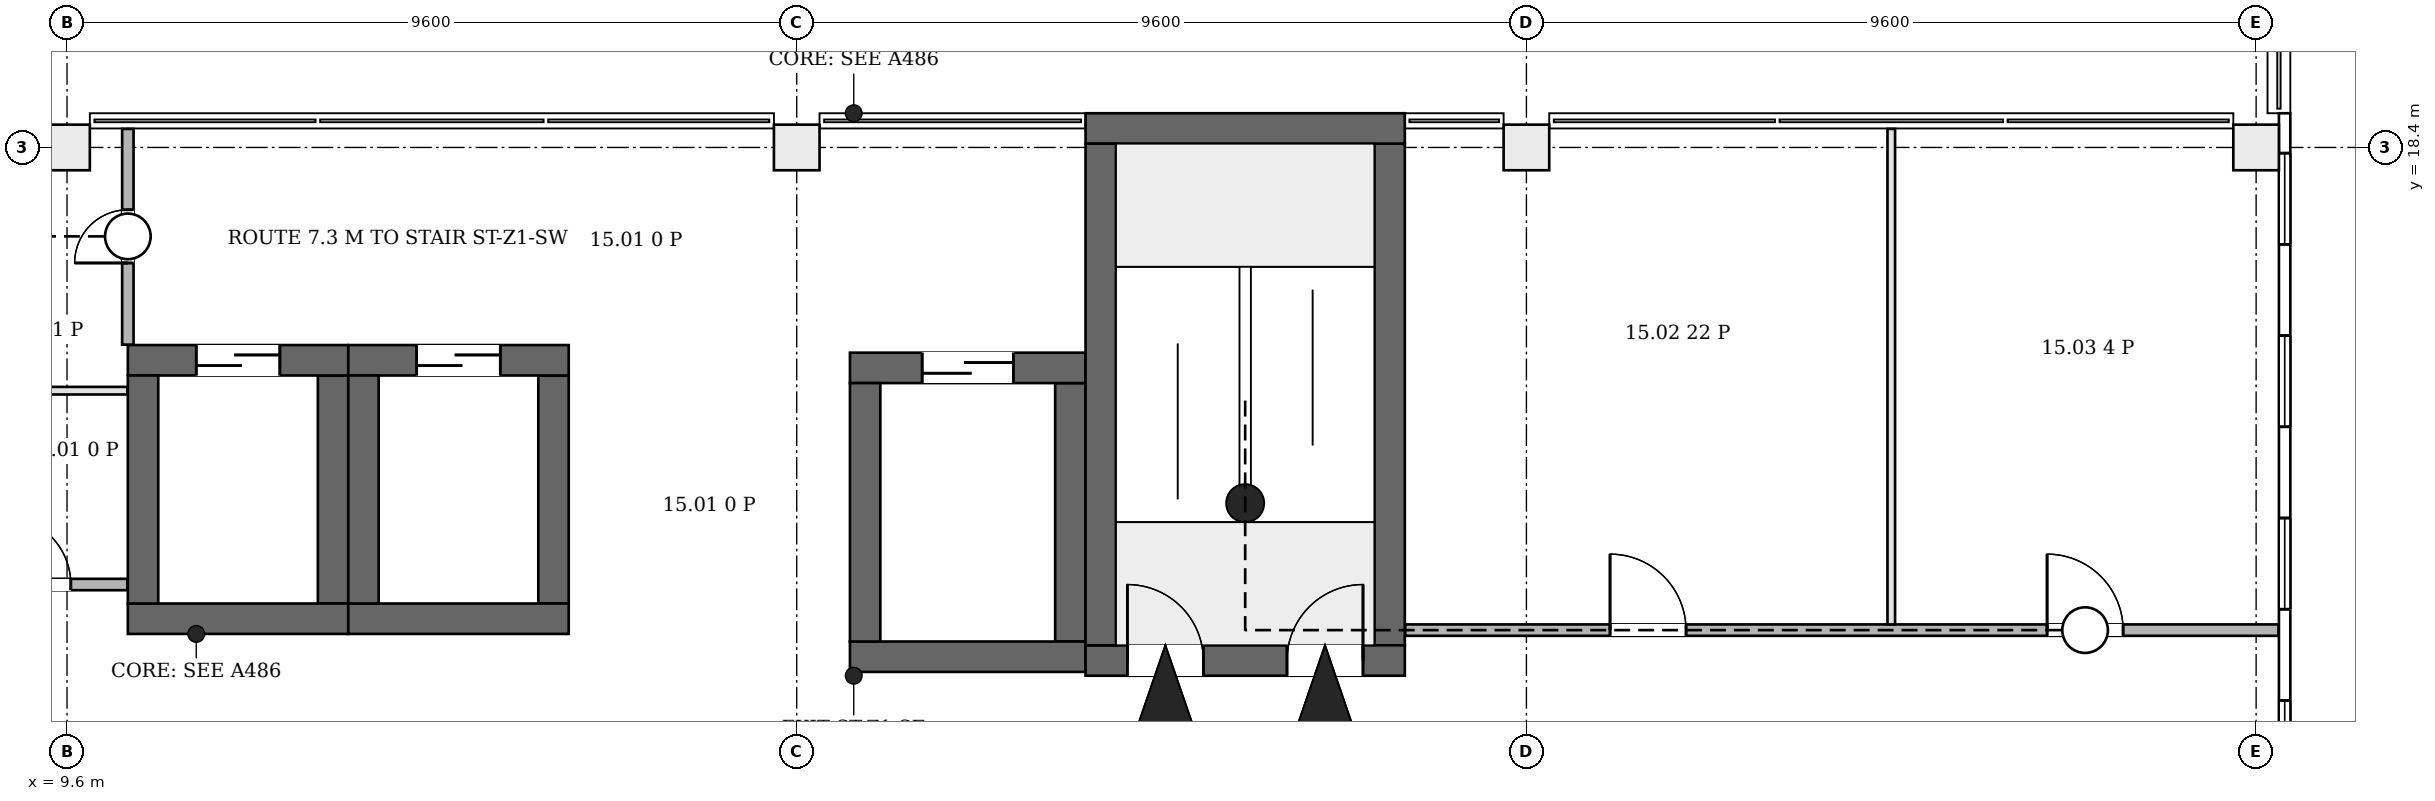
"""IFC4 building model, lengths in metres.
Left out: names, types, materials, properties, quantities, classifications, styles, units other than length and angle.
Written with IfcOpenShell. Run it as: python <this file> out.ifc"""

import sys

from ifc_helpers import new_model, si_unit, direction, frame, frame_2d, origin, origin_2d, place, context, subcontext, project, spatial, rectangle, extrude, element, fill, save


model = new_model("IFC4")
c1 = context("Model", 3, precision=1e-05, world=origin(), true_north=direction((0.0, 1.0)))
c2 = subcontext(c1, "Body", "Model", "MODEL_VIEW")
j1 = project(units=[si_unit("LENGTHUNIT", "METRE"), si_unit("PLANEANGLEUNIT", "RADIAN")], contexts=[c1])
p1 = place(None, origin())
s1 = spatial("IfcSite", under=j1, at=p1, CompositionType="ELEMENT")
p2 = place(p1, origin())
s2 = spatial("IfcBuilding", under=s1, at=p2, CompositionType="ELEMENT")
p3 = place(p2, frame((0.0, 0.0, 73.9)))
s3 = spatial("IfcBuildingStorey", under=s2, at=p3, CompositionType="ELEMENT", Elevation=73.9)
p4 = place(p3, frame((23.0, 11.65, 0.0), z_axis=(0.0, 0.0, 1.0), x_axis=(1.0, 0.0, 0.0)))
e1 = element("IfcWall", 1, at=p4, inside=s3, PredefinedType="SHEAR", context=c2, shape_type="SweptSolid", body=[
    extrude(rectangle(XDim=4.2, YDim=0.4, at=frame_2d((2.1, 0.0))), origin(), (0.0, 0.0, 1.0), 4.2),
])
p5 = place(p4, frame((0.55, 0.0, 0.0)))
e2 = element("IfcOpeningElement", 2, at=p5, cuts=e1, PredefinedType="OPENING", context=c2, shape_type="SweptSolid", body=[
    extrude(rectangle(XDim=1.0, YDim=2.1, at=frame_2d((0.5, 1.05))), frame((0.0, 0.21, 0.0), z_axis=(0.0, -1.0, 0.0), x_axis=(1.0, 0.0, 0.0)), (0.0, 0.0, 1.0), 0.42),
])
p6 = place(p4, frame((2.65, 0.0, 0.0)))
e3 = element("IfcOpeningElement", 3, at=p6, cuts=e1, PredefinedType="OPENING", context=c2, shape_type="SweptSolid", body=[
    extrude(rectangle(XDim=1.0, YDim=2.1, at=frame_2d((0.5, 1.05))), frame((0.0, 0.21, 0.0), z_axis=(0.0, -1.0, 0.0), x_axis=(1.0, 0.0, 0.0)), (0.0, 0.0, 1.0), 0.42),
])
p7 = place(p3, frame((23.0, 18.65, 0.0), z_axis=(0.0, 0.0, 1.0), x_axis=(1.0, 0.0, 0.0)))
e4 = element("IfcWall", 4, at=p7, inside=s3, PredefinedType="SHEAR", context=c2, shape_type="SweptSolid", body=[
    extrude(rectangle(XDim=4.2, YDim=0.4, at=frame_2d((2.1, 0.0))), origin(), (0.0, 0.0, 1.0), 4.2),
])
for number, where, z_axis, x_axis in (
    (5, (23.2, 11.85, 0.0), (0.0, 0.0, 1.0), (0.0, 1.0, 0.0)),
    (6, (27.0, 11.85, 0.0), (0.0, 0.0, 1.0), (0.0, 1.0, 0.0)),
):
    element("IfcWall", number, at=place(p3, frame(where, z_axis=z_axis, x_axis=x_axis)), inside=s3, PredefinedType="SHEAR", context=c2, shape_type="SweptSolid", body=[
        extrude(rectangle(XDim=6.6, YDim=0.4, at=frame_2d((3.3, 0.0))), origin(), (0.0, 0.0, 1.0), 4.2),
    ])
p8 = place(p3, frame((10.4, 12.2, 0.0), z_axis=(0.0, 0.0, 1.0), x_axis=(1.0, 0.0, 0.0)))
e7 = element("IfcWall", 7, at=p8, inside=s3, PredefinedType="SHEAR", context=c2, shape_type="SweptSolid", body=[
    extrude(rectangle(XDim=2.9, YDim=0.4, at=frame_2d((1.45, 0.0))), origin(), (0.0, 0.0, 1.0), 4.2),
])
p9 = place(p3, frame((10.4, 15.6, 0.0), z_axis=(0.0, 0.0, 1.0), x_axis=(1.0, 0.0, 0.0)))
e8 = element("IfcWall", 8, at=p9, inside=s3, PredefinedType="SHEAR", context=c2, shape_type="SweptSolid", body=[
    extrude(rectangle(XDim=2.9, YDim=0.4, at=frame_2d((1.45, 0.0))), origin(), (0.0, 0.0, 1.0), 4.2),
])
p10 = place(p9, frame((0.9, 0.0, 0.0)))
e9 = element("IfcOpeningElement", 9, at=p10, cuts=e8, PredefinedType="OPENING", context=c2, shape_type="SweptSolid", body=[
    extrude(rectangle(XDim=1.1, YDim=2.1, at=frame_2d((0.55, 1.05))), frame((0.0, 0.21, 0.0), z_axis=(0.0, -1.0, 0.0), x_axis=(1.0, 0.0, 0.0)), (0.0, 0.0, 1.0), 0.42),
])
for number, where, z_axis, x_axis in (
    (10, (10.6, 12.4, 0.0), (0.0, 0.0, 1.0), (0.0, 1.0, 0.0)),
    (11, (13.1, 12.4, 0.0), (0.0, 0.0, 1.0), (0.0, 1.0, 0.0)),
):
    element("IfcWall", number, at=place(p3, frame(where, z_axis=z_axis, x_axis=x_axis)), inside=s3, PredefinedType="SHEAR", context=c2, shape_type="SweptSolid", body=[
        extrude(rectangle(XDim=3.0, YDim=0.4, at=frame_2d((1.5, 0.0))), origin(), (0.0, 0.0, 1.0), 4.2),
    ])
p11 = place(p3, frame((13.3, 12.2, 0.0), z_axis=(0.0, 0.0, 1.0), x_axis=(1.0, 0.0, 0.0)))
e12 = element("IfcWall", 12, at=p11, inside=s3, PredefinedType="SHEAR", context=c2, shape_type="SweptSolid", body=[
    extrude(rectangle(XDim=2.9, YDim=0.4, at=frame_2d((1.45, 0.0))), origin(), (0.0, 0.0, 1.0), 4.2),
])
p12 = place(p3, frame((13.3, 15.6, 0.0), z_axis=(0.0, 0.0, 1.0), x_axis=(1.0, 0.0, 0.0)))
e13 = element("IfcWall", 13, at=p12, inside=s3, PredefinedType="SHEAR", context=c2, shape_type="SweptSolid", body=[
    extrude(rectangle(XDim=2.9, YDim=0.4, at=frame_2d((1.45, 0.0))), origin(), (0.0, 0.0, 1.0), 4.2),
])
p13 = place(p12, frame((0.9, 0.0, 0.0)))
e14 = element("IfcOpeningElement", 14, at=p13, cuts=e13, PredefinedType="OPENING", context=c2, shape_type="SweptSolid", body=[
    extrude(rectangle(XDim=1.1, YDim=2.1, at=frame_2d((0.55, 1.05))), frame((0.0, 0.21, 0.0), z_axis=(0.0, -1.0, 0.0), x_axis=(1.0, 0.0, 0.0)), (0.0, 0.0, 1.0), 0.42),
])
for number, where, z_axis, x_axis in (
    (15, (13.5, 12.4, 0.0), (0.0, 0.0, 1.0), (0.0, 1.0, 0.0)),
    (16, (16.0, 12.4, 0.0), (0.0, 0.0, 1.0), (0.0, 1.0, 0.0)),
):
    element("IfcWall", number, at=place(p3, frame(where, z_axis=z_axis, x_axis=x_axis)), inside=s3, PredefinedType="SHEAR", context=c2, shape_type="SweptSolid", body=[
        extrude(rectangle(XDim=3.0, YDim=0.4, at=frame_2d((1.5, 0.0))), origin(), (0.0, 0.0, 1.0), 4.2),
    ])
p14 = place(p3, frame((19.9, 11.7, 0.0), z_axis=(0.0, 0.0, 1.0), x_axis=(1.0, 0.0, 0.0)))
e17 = element("IfcWall", 17, at=p14, inside=s3, PredefinedType="SHEAR", context=c2, shape_type="SweptSolid", body=[
    extrude(rectangle(XDim=3.1, YDim=0.4, at=frame_2d((1.55, 0.0))), origin(), (0.0, 0.0, 1.0), 4.2),
])
p15 = place(p3, frame((19.9, 15.5, 0.0), z_axis=(0.0, 0.0, 1.0), x_axis=(1.0, 0.0, 0.0)))
e18 = element("IfcWall", 18, at=p15, inside=s3, PredefinedType="SHEAR", context=c2, shape_type="SweptSolid", body=[
    extrude(rectangle(XDim=3.1, YDim=0.4, at=frame_2d((1.55, 0.0))), origin(), (0.0, 0.0, 1.0), 4.2),
])
p16 = place(p15, frame((0.95, 0.0, 0.0)))
e19 = element("IfcOpeningElement", 19, at=p16, cuts=e18, PredefinedType="OPENING", context=c2, shape_type="SweptSolid", body=[
    extrude(rectangle(XDim=1.2, YDim=2.1, at=frame_2d((0.6, 1.05))), frame((0.0, 0.21, 0.0), z_axis=(0.0, -1.0, 0.0), x_axis=(1.0, 0.0, 0.0)), (0.0, 0.0, 1.0), 0.42),
])
for number, where, z_axis, x_axis in (
    (20, (20.1, 11.9, 0.0), (0.0, 0.0, 1.0), (0.0, 1.0, 0.0)),
    (21, (22.8, 11.9, 0.0), (0.0, 0.0, 1.0), (0.0, 1.0, 0.0)),
):
    element("IfcWall", number, at=place(p3, frame(where, z_axis=z_axis, x_axis=x_axis)), inside=s3, PredefinedType="SHEAR", context=c2, shape_type="SweptSolid", body=[
        extrude(rectangle(XDim=3.4, YDim=0.4, at=frame_2d((1.7, 0.0))), origin(), (0.0, 0.0, 1.0), 4.2),
    ])
for number, where, z_axis, x_axis in (
    (22, (9.6, 18.4, 0.0), (0.0, 0.0, 1.0), (1.0, 0.0, 0.0)),
    (23, (19.2, 18.4, 0.0), (0.0, 0.0, 1.0), (1.0, 0.0, 0.0)),
    (24, (28.8, 18.4, 0.0), (0.0, 0.0, 1.0), (1.0, 0.0, 0.0)),
    (25, (38.4, 18.4, 0.0), (0.0, 0.0, 1.0), (1.0, 0.0, 0.0)),
):
    element("IfcColumn", number, at=place(p3, frame(where, z_axis=z_axis, x_axis=x_axis)), inside=s3, PredefinedType="COLUMN", context=c2, shape_type="SweptSolid", body=[
        extrude(rectangle(XDim=0.6, YDim=0.6, at=origin_2d()), origin(), (0.0, 0.0, 1.0), 4.2),
    ])
p17 = place(p3, frame((38.775, -0.2, 0.0), z_axis=(0.0, 0.0, 1.0), x_axis=(0.0, 1.0, 0.0)))
e26 = element("IfcWall", 26, at=p17, inside=s3, PredefinedType="ELEMENTEDWALL", context=c2, shape_type="SweptSolid", body=[
    extrude(rectangle(XDim=19.05, YDim=0.15, at=frame_2d((9.525, 0.0))), origin(), (0.0, 0.0, 1.0), 3.9),
])
p18 = place(p17, frame((0.525, 0.0, 0.9)))
e27 = element("IfcOpeningElement", 27, at=p18, cuts=e26, PredefinedType="OPENING", context=c2, shape_type="SweptSolid", body=[
    extrude(rectangle(XDim=1.2, YDim=2.6, at=frame_2d((0.6, 1.3))), frame((0.0, 0.085, 0.0), z_axis=(0.0, -1.0, 0.0), x_axis=(1.0, 0.0, 0.0)), (0.0, 0.0, 1.0), 0.17),
])
p19 = place(p17, frame((2.925, 0.0, 0.9)))
e28 = element("IfcOpeningElement", 28, at=p19, cuts=e26, PredefinedType="OPENING", context=c2, shape_type="SweptSolid", body=[
    extrude(rectangle(XDim=1.2, YDim=2.6, at=frame_2d((0.6, 1.3))), frame((0.0, 0.085, 0.0), z_axis=(0.0, -1.0, 0.0), x_axis=(1.0, 0.0, 0.0)), (0.0, 0.0, 1.0), 0.17),
])
p20 = place(p17, frame((5.325, 0.0, 0.9)))
e29 = element("IfcOpeningElement", 29, at=p20, cuts=e26, PredefinedType="OPENING", context=c2, shape_type="SweptSolid", body=[
    extrude(rectangle(XDim=1.2, YDim=2.6, at=frame_2d((0.6, 1.3))), frame((0.0, 0.085, 0.0), z_axis=(0.0, -1.0, 0.0), x_axis=(1.0, 0.0, 0.0)), (0.0, 0.0, 1.0), 0.17),
])
p21 = place(p17, frame((7.725, 0.0, 0.9)))
e30 = element("IfcOpeningElement", 30, at=p21, cuts=e26, PredefinedType="OPENING", context=c2, shape_type="SweptSolid", body=[
    extrude(rectangle(XDim=1.2, YDim=2.6, at=frame_2d((0.6, 1.3))), frame((0.0, 0.085, 0.0), z_axis=(0.0, -1.0, 0.0), x_axis=(1.0, 0.0, 0.0)), (0.0, 0.0, 1.0), 0.17),
])
p22 = place(p17, frame((10.125, 0.0, 0.9)))
e31 = element("IfcOpeningElement", 31, at=p22, cuts=e26, PredefinedType="OPENING", context=c2, shape_type="SweptSolid", body=[
    extrude(rectangle(XDim=1.2, YDim=2.6, at=frame_2d((0.6, 1.3))), frame((0.0, 0.085, 0.0), z_axis=(0.0, -1.0, 0.0), x_axis=(1.0, 0.0, 0.0)), (0.0, 0.0, 1.0), 0.17),
])
p23 = place(p17, frame((12.525, 0.0, 0.9)))
e32 = element("IfcOpeningElement", 32, at=p23, cuts=e26, PredefinedType="OPENING", context=c2, shape_type="SweptSolid", body=[
    extrude(rectangle(XDim=1.2, YDim=2.6, at=frame_2d((0.6, 1.3))), frame((0.0, 0.085, 0.0), z_axis=(0.0, -1.0, 0.0), x_axis=(1.0, 0.0, 0.0)), (0.0, 0.0, 1.0), 0.17),
])
p24 = place(p17, frame((14.925, 0.0, 0.9)))
e33 = element("IfcOpeningElement", 33, at=p24, cuts=e26, PredefinedType="OPENING", context=c2, shape_type="SweptSolid", body=[
    extrude(rectangle(XDim=1.2, YDim=2.6, at=frame_2d((0.6, 1.3))), frame((0.0, 0.085, 0.0), z_axis=(0.0, -1.0, 0.0), x_axis=(1.0, 0.0, 0.0)), (0.0, 0.0, 1.0), 0.17),
])
p25 = place(p17, frame((17.325, 0.0, 0.9)))
e34 = element("IfcOpeningElement", 34, at=p25, cuts=e26, PredefinedType="OPENING", context=c2, shape_type="SweptSolid", body=[
    extrude(rectangle(XDim=1.2, YDim=2.6, at=frame_2d((0.6, 1.3))), frame((0.0, 0.085, 0.0), z_axis=(0.0, -1.0, 0.0), x_axis=(1.0, 0.0, 0.0)), (0.0, 0.0, 1.0), 0.17),
])
p26 = place(p3, frame((6.125, 12.65, 0.0), z_axis=(0.0, 0.0, 1.0), x_axis=(1.0, 0.0, 0.0)))
e35 = element("IfcWall", 35, at=p26, inside=s3, PredefinedType="PARTITIONING", context=c2, shape_type="SweptSolid", body=[
    extrude(rectangle(XDim=4.269, YDim=0.15, at=frame_2d((2.135, 0.0))), origin(), (0.0, 0.0, 1.0), 3.9),
])
p27 = place(p26, frame((2.625, 0.0, 0.0)))
e36 = element("IfcOpeningElement", 36, at=p27, cuts=e35, PredefinedType="OPENING", context=c2, shape_type="SweptSolid", body=[
    extrude(rectangle(XDim=0.9, YDim=2.1, at=frame_2d((0.45, 1.05))), frame((0.0, 0.085, 0.0), z_axis=(0.0, -1.0, 0.0), x_axis=(1.0, 0.0, 0.0)), (0.0, 0.0, 1.0), 0.17),
])
p28 = place(p3, frame((6.275, 15.2, 0.0), z_axis=(0.0, 0.0, 1.0), x_axis=(1.0, 0.0, 0.0)))
e37 = element("IfcWall", 37, at=p28, inside=s3, PredefinedType="PARTITIONING", context=c2, shape_type="SweptSolid", body=[
    extrude(rectangle(XDim=4.119, YDim=0.1, at=frame_2d((2.06, 0.0))), origin(), (0.0, 0.0, 1.0), 3.9),
])
p29 = place(p3, frame((10.4, 15.806, 0.0), z_axis=(0.0, 0.0, 1.0), x_axis=(0.0, 1.0, 0.0)))
e38 = element("IfcWall", 38, at=p29, inside=s3, PredefinedType="PARTITIONING", context=c2, shape_type="SweptSolid", body=[
    extrude(rectangle(XDim=2.838, YDim=0.15, at=frame_2d((1.419, 0.0))), origin(), (0.0, 0.0, 1.0), 3.9),
])
p30 = place(p29, frame((1.074, 0.0, 0.0)))
e39 = element("IfcOpeningElement", 39, at=p30, cuts=e38, PredefinedType="OPENING", context=c2, shape_type="SweptSolid", body=[
    extrude(rectangle(XDim=0.7, YDim=2.1, at=frame_2d((0.35, 1.05))), frame((0.0, 0.085, 0.0), z_axis=(0.0, -1.0, 0.0), x_axis=(1.0, 0.0, 0.0)), (0.0, 0.0, 1.0), 0.17),
])
p31 = place(p3, frame((27.206, 12.05, 0.0), z_axis=(0.0, 0.0, 1.0), x_axis=(1.0, 0.0, 0.0)))
e40 = element("IfcWall", 40, at=p31, inside=s3, PredefinedType="PARTITIONING", context=c2, shape_type="SweptSolid", body=[
    extrude(rectangle(XDim=11.488, YDim=0.15, at=frame_2d((5.744, 0.0))), origin(), (0.0, 0.0, 1.0), 3.9),
])
p32 = place(p31, frame((2.694, 0.0, 0.0)))
e41 = element("IfcOpeningElement", 41, at=p32, cuts=e40, PredefinedType="OPENING", context=c2, shape_type="SweptSolid", body=[
    extrude(rectangle(XDim=1.0, YDim=2.1, at=frame_2d((0.5, 1.05))), frame((0.0, 0.085, 0.0), z_axis=(0.0, -1.0, 0.0), x_axis=(1.0, 0.0, 0.0)), (0.0, 0.0, 1.0), 0.17),
])
p33 = place(p31, frame((8.444, 0.0, 0.0)))
e42 = element("IfcOpeningElement", 42, at=p33, cuts=e40, PredefinedType="OPENING", context=c2, shape_type="SweptSolid", body=[
    extrude(rectangle(XDim=1.0, YDim=2.1, at=frame_2d((0.5, 1.05))), frame((0.0, 0.085, 0.0), z_axis=(0.0, -1.0, 0.0), x_axis=(1.0, 0.0, 0.0)), (0.0, 0.0, 1.0), 0.17),
])
p34 = place(p3, frame((33.6, 12.125, 0.0), z_axis=(0.0, 0.0, 1.0), x_axis=(0.0, 1.0, 0.0)))
e43 = element("IfcWall", 43, at=p34, inside=s3, PredefinedType="PARTITIONING", context=c2, shape_type="SweptSolid", body=[
    extrude(rectangle(XDim=6.519, YDim=0.1, at=frame_2d((3.26, 0.0))), origin(), (0.0, 0.0, 1.0), 3.9),
])
p35 = place(p22, origin())
e44 = element("IfcWindow", 44, at=p35, inside=s3, PartitioningType="SINGLE_PANEL", PredefinedType="WINDOW", context=c2, shape_type="SweptSolid", body=[
    extrude(rectangle(XDim=1.2, YDim=2.6, at=frame_2d((0.6, 1.3))), frame((0.0, 0.03, 0.0), z_axis=(0.0, -1.0, 0.0), x_axis=(1.0, 0.0, 0.0)), (0.0, 0.0, 1.0), 0.06),
])
fill(e31, e44)
p36 = place(p23, origin())
e45 = element("IfcWindow", 45, at=p36, inside=s3, PartitioningType="SINGLE_PANEL", PredefinedType="WINDOW", context=c2, shape_type="SweptSolid", body=[
    extrude(rectangle(XDim=1.2, YDim=2.6, at=frame_2d((0.6, 1.3))), frame((0.0, 0.03, 0.0), z_axis=(0.0, -1.0, 0.0), x_axis=(1.0, 0.0, 0.0)), (0.0, 0.0, 1.0), 0.06),
])
fill(e32, e45)
p37 = place(p24, origin())
e46 = element("IfcWindow", 46, at=p37, inside=s3, PartitioningType="SINGLE_PANEL", PredefinedType="WINDOW", context=c2, shape_type="SweptSolid", body=[
    extrude(rectangle(XDim=1.2, YDim=2.6, at=frame_2d((0.6, 1.3))), frame((0.0, 0.03, 0.0), z_axis=(0.0, -1.0, 0.0), x_axis=(1.0, 0.0, 0.0)), (0.0, 0.0, 1.0), 0.06),
])
fill(e33, e46)
p38 = place(p25, origin())
e47 = element("IfcWindow", 47, at=p38, inside=s3, PartitioningType="SINGLE_PANEL", PredefinedType="WINDOW", context=c2, shape_type="SweptSolid", body=[
    extrude(rectangle(XDim=1.2, YDim=2.6, at=frame_2d((0.6, 1.3))), frame((0.0, 0.03, 0.0), z_axis=(0.0, -1.0, 0.0), x_axis=(1.0, 0.0, 0.0)), (0.0, 0.0, 1.0), 0.06),
])
fill(e34, e47)
p39 = place(p5, origin())
e48 = element("IfcDoor", 48, at=p39, inside=s3, OperationType="SINGLE_SWING_RIGHT", PredefinedType="DOOR", context=c2, shape_type="SweptSolid", body=[
    extrude(rectangle(XDim=1.0, YDim=2.1, at=frame_2d((0.5, 1.05))), frame((0.0, 0.025, 0.0), z_axis=(0.0, -1.0, 0.0), x_axis=(1.0, 0.0, 0.0)), (0.0, 0.0, 1.0), 0.05),
])
fill(e2, e48)
p40 = place(p6, origin())
e49 = element("IfcDoor", 49, at=p40, inside=s3, OperationType="SINGLE_SWING_LEFT", PredefinedType="DOOR", context=c2, shape_type="SweptSolid", body=[
    extrude(rectangle(XDim=1.0, YDim=2.1, at=frame_2d((0.5, 1.05))), frame((0.0, 0.025, 0.0), z_axis=(0.0, -1.0, 0.0), x_axis=(1.0, 0.0, 0.0)), (0.0, 0.0, 1.0), 0.05),
])
fill(e3, e49)
p41 = place(p10, origin())
e50 = element("IfcDoor", 50, at=p41, inside=s3, OperationType="DOUBLE_DOOR_SLIDING", PredefinedType="DOOR", context=c2, shape_type="SweptSolid", body=[
    extrude(rectangle(XDim=1.1, YDim=2.1, at=frame_2d((0.55, 1.05))), frame((0.0, 0.025, 0.0), z_axis=(0.0, -1.0, 0.0), x_axis=(1.0, 0.0, 0.0)), (0.0, 0.0, 1.0), 0.05),
])
fill(e9, e50)
p42 = place(p13, origin())
e51 = element("IfcDoor", 51, at=p42, inside=s3, OperationType="DOUBLE_DOOR_SLIDING", PredefinedType="DOOR", context=c2, shape_type="SweptSolid", body=[
    extrude(rectangle(XDim=1.1, YDim=2.1, at=frame_2d((0.55, 1.05))), frame((0.0, 0.025, 0.0), z_axis=(0.0, -1.0, 0.0), x_axis=(1.0, 0.0, 0.0)), (0.0, 0.0, 1.0), 0.05),
])
fill(e14, e51)
p43 = place(p16, origin())
e52 = element("IfcDoor", 52, at=p43, inside=s3, OperationType="DOUBLE_DOOR_SLIDING", PredefinedType="DOOR", context=c2, shape_type="SweptSolid", body=[
    extrude(rectangle(XDim=1.2, YDim=2.1, at=frame_2d((0.6, 1.05))), frame((0.0, 0.025, 0.0), z_axis=(0.0, -1.0, 0.0), x_axis=(1.0, 0.0, 0.0)), (0.0, 0.0, 1.0), 0.05),
])
fill(e19, e52)
p44 = place(p27, origin())
e53 = element("IfcDoor", 53, at=p44, inside=s3, OperationType="SINGLE_SWING_RIGHT", PredefinedType="DOOR", context=c2, shape_type="SweptSolid", body=[
    extrude(rectangle(XDim=0.9, YDim=2.1, at=frame_2d((0.45, 1.05))), frame((0.0, 0.025, 0.0), z_axis=(0.0, -1.0, 0.0), x_axis=(1.0, 0.0, 0.0)), (0.0, 0.0, 1.0), 0.05),
])
fill(e36, e53)
p45 = place(p30, origin())
e54 = element("IfcDoor", 54, at=p45, inside=s3, OperationType="SINGLE_SWING_LEFT", PredefinedType="DOOR", context=c2, shape_type="SweptSolid", body=[
    extrude(rectangle(XDim=0.7, YDim=2.1, at=frame_2d((0.35, 1.05))), frame((0.0, 0.025, 0.0), z_axis=(0.0, -1.0, 0.0), x_axis=(1.0, 0.0, 0.0)), (0.0, 0.0, 1.0), 0.05),
])
fill(e39, e54)
p46 = place(p32, origin())
e55 = element("IfcDoor", 55, at=p46, inside=s3, OperationType="SINGLE_SWING_LEFT", PredefinedType="DOOR", context=c2, shape_type="SweptSolid", body=[
    extrude(rectangle(XDim=1.0, YDim=2.1, at=frame_2d((0.5, 1.05))), frame((0.0, 0.025, 0.0), z_axis=(0.0, -1.0, 0.0), x_axis=(1.0, 0.0, 0.0)), (0.0, 0.0, 1.0), 0.05),
])
fill(e41, e55)
p47 = place(p33, origin())
e56 = element("IfcDoor", 56, at=p47, inside=s3, OperationType="SINGLE_SWING_RIGHT", PredefinedType="DOOR", context=c2, shape_type="SweptSolid", body=[
    extrude(rectangle(XDim=1.0, YDim=2.1, at=frame_2d((0.5, 1.05))), frame((0.0, 0.025, 0.0), z_axis=(0.0, -1.0, 0.0), x_axis=(1.0, 0.0, 0.0)), (0.0, 0.0, 1.0), 0.05),
])
fill(e42, e56)
save(model, sys.argv[1])
